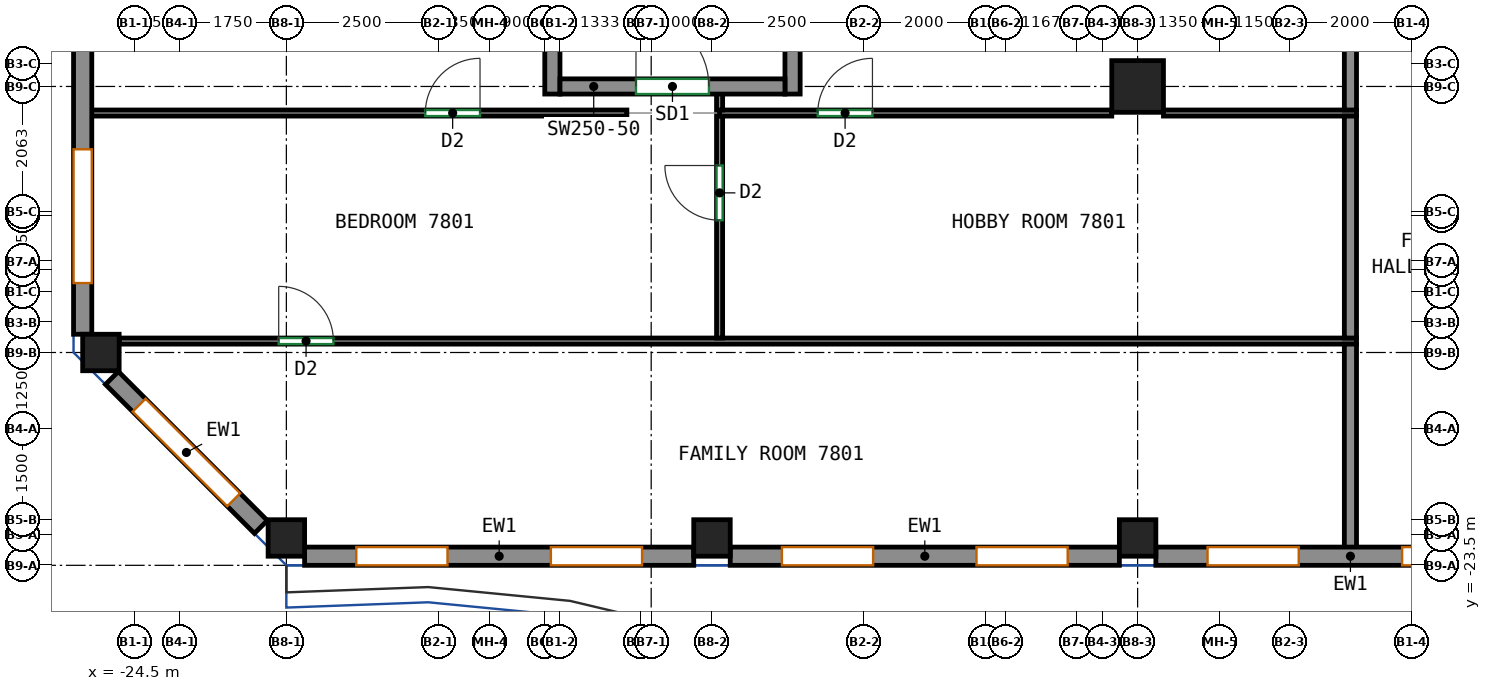
"""IFC4 building model, lengths in metres.
Left out: names, types, materials, properties, quantities, classifications, styles, units other than length and angle.
Written with IfcOpenShell. Run it as: python <this file> out.ifc"""

import sys

from ifc_helpers import new_model, si_unit, direction, frame, frame_2d, origin, origin_2d, place, context, subcontext, project, spatial, rectangle, extrude, source, transform, mapped, element, fill, save


model = new_model("IFC4")
c1 = context("Model", 3, precision=1e-05, world=origin(), true_north=direction((0.0, 1.0)))
c2 = subcontext(c1, "Body", "Model", "MODEL_VIEW")
j1 = project(units=[si_unit("LENGTHUNIT", "METRE"), si_unit("PLANEANGLEUNIT", "RADIAN")], contexts=[c1])
p1 = place(None, origin())
s1 = spatial("IfcSite", under=j1, at=p1, CompositionType="ELEMENT")
p2 = place(p1, origin())
s2 = spatial("IfcBuilding", under=s1, at=p2, CompositionType="ELEMENT")
p3 = place(p2, frame((0.0, 0.0, 312.0)))
s3 = spatial("IfcBuildingStorey", under=s2, at=p3, CompositionType="ELEMENT", Elevation=312.0)
m1 = source(origin(), c2, "Body", "SweptSolid", [
    extrude(rectangle(XDim=0.6, YDim=0.6, at=origin_2d()), origin(), (0.0, 0.0, 1.0), 3.12),
])
for number, where, z_axis, x_axis in (
    (1, (-25.05, -20.0, 0.0), (0.0, 0.0, 1.0), (1.0, 0.0, 0.0)),
    (2, (-22.0, -23.05, 0.0), (0.0, 0.0, 1.0), (1.0, 0.0, 0.0)),
    (3, (-15.0, -23.05, 0.0), (0.0, 0.0, 1.0), (1.0, 0.0, 0.0)),
    (4, (-8.0, -23.05, 0.0), (0.0, 0.0, 1.0), (1.0, 0.0, 0.0)),
):
    element("IfcColumn", number, at=place(p3, frame(where, z_axis=z_axis, x_axis=x_axis)), inside=s3, PredefinedType="COLUMN", context=c2, shape_type="MappedRepresentation", body=[
        mapped(m1, transform((0.0, 0.0, 0.0))),
    ])
m2 = source(origin(), c2, "Body", "SweptSolid", [
    extrude(rectangle(XDim=0.85, YDim=0.85, at=origin_2d()), origin(), (0.0, 0.0, 1.0), 3.12),
])
p4 = place(p3, frame((-8.0, -15.625, 0.0), z_axis=(0.0, 0.0, 1.0), x_axis=(1.0, 0.0, 0.0)))
e5 = element("IfcColumn", 5, at=p4, inside=s3, PredefinedType="COLUMN", context=c2, shape_type="MappedRepresentation", body=[
    mapped(m2, transform((0.0, 0.0, 0.0))),
])
m3 = source(origin(), c2, "Body", "SweptSolid", [
    extrude(rectangle(XDim=8.0, YDim=0.25, at=frame_2d((4.0, 0.0))), origin(), (0.0, 0.0, 1.0), 3.12),
])
for number, where, z_axis, x_axis in (
    (6, (-17.625, -15.75, 0.0), (0.0, 0.0, 1.0), (0.0, 1.0, 0.0)),
    (7, (-13.675, -15.75, 0.0), (0.0, 0.0, 1.0), (0.0, 1.0, 0.0)),
):
    element("IfcWall", number, at=place(p3, frame(where, z_axis=z_axis, x_axis=x_axis)), inside=s3, PredefinedType="SHEAR", context=c2, shape_type="MappedRepresentation", body=[
        mapped(m3, transform((0.0, 0.0, 0.0))),
    ])
m4 = source(origin(), c2, "Body", "SweptSolid", [
    extrude(rectangle(XDim=3.7, YDim=0.25, at=frame_2d((1.85, 0.0))), origin(), (0.0, 0.0, 1.0), 3.12),
])
p5 = place(p3, frame((-17.5, -15.625, 0.0), z_axis=(0.0, 0.0, 1.0), x_axis=(1.0, 0.0, 0.0)))
e8 = element("IfcWall", 8, at=p5, inside=s3, PredefinedType="SHEAR", context=c2, shape_type="MappedRepresentation", body=[
    mapped(m4, transform((0.0, 0.0, 0.0))),
])
p6 = place(p5, frame((1.25, 0.0, 0.0)))
e9 = element("IfcOpeningElement", 9, at=p6, cuts=e8, PredefinedType="OPENING", context=c2, shape_type="SweptSolid", body=[
    extrude(rectangle(XDim=1.2, YDim=2.1, at=frame_2d((0.6, 1.05))), frame((0.0, 0.135, 0.0), z_axis=(0.0, -1.0, 0.0), x_axis=(1.0, 0.0, 0.0)), (0.0, 0.0, 1.0), 0.27),
])
m5 = source(origin(), c2, "Body", "SweptSolid", [
    extrude(rectangle(XDim=6.4, YDim=0.3, at=frame_2d((3.2, 0.0))), origin(), (0.0, 0.0, 1.0), 3.12),
])
p7 = place(p3, frame((-21.7, -23.35, 0.0), z_axis=(0.0, 0.0, 1.0), x_axis=(1.0, 0.0, 0.0)))
e10 = element("IfcWall", 10, at=p7, inside=s3, PredefinedType="SOLIDWALL", context=c2, shape_type="MappedRepresentation", body=[
    mapped(m5, transform((0.0, 0.0, 0.0))),
])
p8 = place(p7, frame((0.85, 0.0, 0.8)))
e11 = element("IfcOpeningElement", 11, at=p8, cuts=e10, PredefinedType="OPENING", context=c2, shape_type="SweptSolid", body=[
    extrude(rectangle(XDim=1.5, YDim=2.05, at=frame_2d((0.75, 1.025))), frame((0.0, 0.16, 0.0), z_axis=(0.0, -1.0, 0.0), x_axis=(1.0, 0.0, 0.0)), (0.0, 0.0, 1.0), 0.32),
])
p9 = place(p7, frame((4.05, 0.0, 0.8)))
e12 = element("IfcOpeningElement", 12, at=p9, cuts=e10, PredefinedType="OPENING", context=c2, shape_type="SweptSolid", body=[
    extrude(rectangle(XDim=1.5, YDim=2.05, at=frame_2d((0.75, 1.025))), frame((0.0, 0.16, 0.0), z_axis=(0.0, -1.0, 0.0), x_axis=(1.0, 0.0, 0.0)), (0.0, 0.0, 1.0), 0.32),
])
p10 = place(p3, frame((-14.7, -23.35, 0.0), z_axis=(0.0, 0.0, 1.0), x_axis=(1.0, 0.0, 0.0)))
e13 = element("IfcWall", 13, at=p10, inside=s3, PredefinedType="SOLIDWALL", context=c2, shape_type="MappedRepresentation", body=[
    mapped(m5, transform((0.0, 0.0, 0.0))),
])
p11 = place(p10, frame((0.85, 0.0, 0.8)))
e14 = element("IfcOpeningElement", 14, at=p11, cuts=e13, PredefinedType="OPENING", context=c2, shape_type="SweptSolid", body=[
    extrude(rectangle(XDim=1.5, YDim=2.05, at=frame_2d((0.75, 1.025))), frame((0.0, 0.16, 0.0), z_axis=(0.0, -1.0, 0.0), x_axis=(1.0, 0.0, 0.0)), (0.0, 0.0, 1.0), 0.32),
])
p12 = place(p10, frame((4.05, 0.0, 0.8)))
e15 = element("IfcOpeningElement", 15, at=p12, cuts=e13, PredefinedType="OPENING", context=c2, shape_type="SweptSolid", body=[
    extrude(rectangle(XDim=1.5, YDim=2.05, at=frame_2d((0.75, 1.025))), frame((0.0, 0.16, 0.0), z_axis=(0.0, -1.0, 0.0), x_axis=(1.0, 0.0, 0.0)), (0.0, 0.0, 1.0), 0.32),
])
p13 = place(p3, frame((-7.7, -23.35, 0.0), z_axis=(0.0, 0.0, 1.0), x_axis=(1.0, 0.0, 0.0)))
e16 = element("IfcWall", 16, at=p13, inside=s3, PredefinedType="SOLIDWALL", context=c2, shape_type="MappedRepresentation", body=[
    mapped(m5, transform((0.0, 0.0, 0.0))),
])
p14 = place(p13, frame((0.85, 0.0, 0.8)))
e17 = element("IfcOpeningElement", 17, at=p14, cuts=e16, PredefinedType="OPENING", context=c2, shape_type="SweptSolid", body=[
    extrude(rectangle(XDim=1.5, YDim=2.05, at=frame_2d((0.75, 1.025))), frame((0.0, 0.16, 0.0), z_axis=(0.0, -1.0, 0.0), x_axis=(1.0, 0.0, 0.0)), (0.0, 0.0, 1.0), 0.32),
])
p15 = place(p13, frame((4.05, 0.0, 0.8)))
e18 = element("IfcOpeningElement", 18, at=p15, cuts=e16, PredefinedType="OPENING", context=c2, shape_type="SweptSolid", body=[
    extrude(rectangle(XDim=1.5, YDim=2.05, at=frame_2d((0.75, 1.025))), frame((0.0, 0.16, 0.0), z_axis=(0.0, -1.0, 0.0), x_axis=(1.0, 0.0, 0.0)), (0.0, 0.0, 1.0), 0.32),
])
m6 = source(origin(), c2, "Body", "SweptSolid", [
    extrude(rectangle(XDim=11.65, YDim=0.3, at=frame_2d((5.825, 0.0))), origin(), (0.0, 0.0, 1.0), 3.12),
])
p16 = place(p3, frame((-25.35, -8.05, 0.0), z_axis=(0.0, 0.0, 1.0), x_axis=(0.0, -1.0, 0.0)))
e19 = element("IfcWall", 19, at=p16, inside=s3, PredefinedType="SOLIDWALL", context=c2, shape_type="MappedRepresentation", body=[
    mapped(m6, transform((0.0, 0.0, 0.0))),
])
p17 = place(p16, frame((0.842, 0.0, 0.8)))
e20 = element("IfcOpeningElement", 20, at=p17, cuts=e19, PredefinedType="OPENING", context=c2, shape_type="SweptSolid", body=[
    extrude(rectangle(XDim=2.2, YDim=2.05, at=frame_2d((1.1, 1.025))), frame((0.0, 0.16, 0.0), z_axis=(0.0, -1.0, 0.0), x_axis=(1.0, 0.0, 0.0)), (0.0, 0.0, 1.0), 0.32),
])
p18 = place(p16, frame((4.725, 0.0, 0.8)))
e21 = element("IfcOpeningElement", 21, at=p18, cuts=e19, PredefinedType="OPENING", context=c2, shape_type="SweptSolid", body=[
    extrude(rectangle(XDim=2.2, YDim=2.05, at=frame_2d((1.1, 1.025))), frame((0.0, 0.16, 0.0), z_axis=(0.0, -1.0, 0.0), x_axis=(1.0, 0.0, 0.0)), (0.0, 0.0, 1.0), 0.32),
])
p19 = place(p16, frame((8.608, 0.0, 0.8)))
e22 = element("IfcOpeningElement", 22, at=p19, cuts=e19, PredefinedType="OPENING", context=c2, shape_type="SweptSolid", body=[
    extrude(rectangle(XDim=2.2, YDim=2.05, at=frame_2d((1.1, 1.025))), frame((0.0, 0.16, 0.0), z_axis=(0.0, -1.0, 0.0), x_axis=(1.0, 0.0, 0.0)), (0.0, 0.0, 1.0), 0.32),
])
m7 = source(origin(), c2, "Body", "SweptSolid", [
    extrude(rectangle(XDim=3.465, YDim=0.3, at=frame_2d((1.732, 0.0))), origin(), (0.0, 0.0, 1.0), 3.12),
])
p20 = place(p3, frame((-24.869, -20.419, 0.0), z_axis=(0.0, 0.0, 1.0), x_axis=(0.707106781187, -0.707106781187, 0.0)))
e23 = element("IfcWall", 23, at=p20, inside=s3, PredefinedType="SOLIDWALL", context=c2, shape_type="MappedRepresentation", body=[
    mapped(m7, transform((0.0, 0.0, 0.0))),
])
p21 = place(p20, frame((0.632, 0.0, 0.8)))
e24 = element("IfcOpeningElement", 24, at=p21, cuts=e23, PredefinedType="OPENING", context=c2, shape_type="SweptSolid", body=[
    extrude(rectangle(XDim=2.2, YDim=2.05, at=frame_2d((1.1, 1.025))), frame((0.0, 0.16, 0.0), z_axis=(0.0, -1.0, 0.0), x_axis=(1.0, 0.0, 0.0)), (0.0, 0.0, 1.0), 0.32),
])
p22 = place(p3, frame((-24.75, -19.812, 0.0), z_axis=(0.0, 0.0, 1.0), x_axis=(1.0, 0.0, 0.0)))
e25 = element("IfcWall", 25, at=p22, inside=s3, PredefinedType="PARTITIONING", context=c2, shape_type="SweptSolid", body=[
    extrude(rectangle(XDim=20.35, YDim=0.1, at=frame_2d((10.175, 0.0))), origin(), (0.0, 0.0, 1.0), 3.12),
])
p23 = place(p22, frame((2.624, 0.0, 0.0)))
e26 = element("IfcOpeningElement", 26, at=p23, cuts=e25, PredefinedType="OPENING", context=c2, shape_type="SweptSolid", body=[
    extrude(rectangle(XDim=0.9, YDim=2.1, at=frame_2d((0.45, 1.05))), frame((0.0, 0.06, 0.0), z_axis=(0.0, -1.0, 0.0), x_axis=(1.0, 0.0, 0.0)), (0.0, 0.0, 1.0), 0.12),
])
p24 = place(p3, frame((-4.5, -23.25, 0.0), z_axis=(0.0, 0.0, 1.0), x_axis=(0.0, 1.0, 0.0)))
e27 = element("IfcWall", 27, at=p24, inside=s3, PredefinedType="PARTITIONING", context=c2, shape_type="SweptSolid", body=[
    extrude(rectangle(XDim=3.388, YDim=0.2, at=frame_2d((1.694, 0.0))), origin(), (0.0, 0.0, 1.0), 3.12),
])
p25 = place(p3, frame((-14.875, -19.762, 0.0), z_axis=(0.0, 0.0, 1.0), x_axis=(0.0, 1.0, 0.0)))
e28 = element("IfcWall", 28, at=p25, inside=s3, PredefinedType="PARTITIONING", context=c2, shape_type="SweptSolid", body=[
    extrude(rectangle(XDim=3.65, YDim=0.1, at=frame_2d((1.825, 0.0))), origin(), (0.0, 0.0, 1.0), 3.12),
])
p26 = place(p25, frame((1.937, 0.0, 0.0)))
e29 = element("IfcOpeningElement", 29, at=p26, cuts=e28, PredefinedType="OPENING", context=c2, shape_type="SweptSolid", body=[
    extrude(rectangle(XDim=0.9, YDim=2.1, at=frame_2d((0.45, 1.05))), frame((0.0, 0.06, 0.0), z_axis=(0.0, -1.0, 0.0), x_axis=(1.0, 0.0, 0.0)), (0.0, 0.0, 1.0), 0.12),
])
p27 = place(p3, frame((-25.25, -16.062, 0.0), z_axis=(0.0, 0.0, 1.0), x_axis=(1.0, 0.0, 0.0)))
e30 = element("IfcWall", 30, at=p27, inside=s3, PredefinedType="PARTITIONING", context=c2, shape_type="SweptSolid", body=[
    extrude(rectangle(XDim=8.85, YDim=0.1, at=frame_2d((4.425, 0.0))), origin(), (0.0, 0.0, 1.0), 3.12),
])
p28 = place(p27, frame((5.535, 0.0, 0.0)))
e31 = element("IfcOpeningElement", 31, at=p28, cuts=e30, PredefinedType="OPENING", context=c2, shape_type="SweptSolid", body=[
    extrude(rectangle(XDim=0.9, YDim=2.1, at=frame_2d((0.45, 1.05))), frame((0.0, 0.06, 0.0), z_axis=(0.0, -1.0, 0.0), x_axis=(1.0, 0.0, 0.0)), (0.0, 0.0, 1.0), 0.12),
])
p29 = place(p3, frame((-7.575, -16.062, 0.0), z_axis=(0.0, 0.0, 1.0), x_axis=(1.0, 0.0, 0.0)))
e32 = element("IfcWall", 32, at=p29, inside=s3, PredefinedType="PARTITIONING", context=c2, shape_type="SweptSolid", body=[
    extrude(rectangle(XDim=3.175, YDim=0.1, at=frame_2d((1.587, 0.0))), origin(), (0.0, 0.0, 1.0), 3.12),
])
p30 = place(p3, frame((-14.875, -16.062, 0.0), z_axis=(0.0, 0.0, 1.0), x_axis=(1.0, 0.0, 0.0)))
e33 = element("IfcWall", 33, at=p30, inside=s3, PredefinedType="PARTITIONING", context=c2, shape_type="SweptSolid", body=[
    extrude(rectangle(XDim=6.45, YDim=0.1, at=frame_2d((3.225, 0.0))), origin(), (0.0, 0.0, 1.0), 3.12),
])
p31 = place(p30, frame((1.614, 0.0, 0.0)))
e34 = element("IfcOpeningElement", 34, at=p31, cuts=e33, PredefinedType="OPENING", context=c2, shape_type="SweptSolid", body=[
    extrude(rectangle(XDim=0.9, YDim=2.1, at=frame_2d((0.45, 1.05))), frame((0.0, 0.06, 0.0), z_axis=(0.0, -1.0, 0.0), x_axis=(1.0, 0.0, 0.0)), (0.0, 0.0, 1.0), 0.12),
])
p32 = place(p3, frame((-4.5, -19.762, 0.0), z_axis=(0.0, 0.0, 1.0), x_axis=(0.0, 1.0, 0.0)))
e35 = element("IfcWall", 35, at=p32, inside=s3, PredefinedType="PARTITIONING", context=c2, shape_type="SweptSolid", body=[
    extrude(rectangle(XDim=3.65, YDim=0.2, at=frame_2d((1.825, 0.0))), origin(), (0.0, 0.0, 1.0), 3.12),
])
p33 = place(p3, frame((-14.875, -16.012, 0.0), z_axis=(0.0, 0.0, 1.0), x_axis=(0.0, 1.0, 0.0)))
e36 = element("IfcWall", 36, at=p33, inside=s3, PredefinedType="PARTITIONING", context=c2, shape_type="SweptSolid", body=[
    extrude(rectangle(XDim=0.312, YDim=0.1, at=frame_2d((0.156, 0.0))), origin(), (0.0, 0.0, 1.0), 3.12),
])
p34 = place(p3, frame((-4.5, -16.012, 0.0), z_axis=(0.0, 0.0, 1.0), x_axis=(0.0, 1.0, 0.0)))
e37 = element("IfcWall", 37, at=p34, inside=s3, PredefinedType="PARTITIONING", context=c2, shape_type="SweptSolid", body=[
    extrude(rectangle(XDim=3.7, YDim=0.2, at=frame_2d((1.85, 0.0))), origin(), (0.0, 0.0, 1.0), 3.12),
])
p35 = place(p8, origin())
e38 = element("IfcWindow", 38, at=p35, inside=s3, PartitioningType="SINGLE_PANEL", PredefinedType="WINDOW", context=c2, shape_type="SweptSolid", body=[
    extrude(rectangle(XDim=1.5, YDim=2.05, at=frame_2d((0.75, 1.025))), frame((0.0, 0.03, 0.0), z_axis=(0.0, -1.0, 0.0), x_axis=(1.0, 0.0, 0.0)), (0.0, 0.0, 1.0), 0.06),
])
fill(e11, e38)
p36 = place(p9, origin())
e39 = element("IfcWindow", 39, at=p36, inside=s3, PartitioningType="SINGLE_PANEL", PredefinedType="WINDOW", context=c2, shape_type="SweptSolid", body=[
    extrude(rectangle(XDim=1.5, YDim=2.05, at=frame_2d((0.75, 1.025))), frame((0.0, 0.03, 0.0), z_axis=(0.0, -1.0, 0.0), x_axis=(1.0, 0.0, 0.0)), (0.0, 0.0, 1.0), 0.06),
])
fill(e12, e39)
p37 = place(p11, origin())
e40 = element("IfcWindow", 40, at=p37, inside=s3, PartitioningType="SINGLE_PANEL", PredefinedType="WINDOW", context=c2, shape_type="SweptSolid", body=[
    extrude(rectangle(XDim=1.5, YDim=2.05, at=frame_2d((0.75, 1.025))), frame((0.0, 0.03, 0.0), z_axis=(0.0, -1.0, 0.0), x_axis=(1.0, 0.0, 0.0)), (0.0, 0.0, 1.0), 0.06),
])
fill(e14, e40)
p38 = place(p12, origin())
e41 = element("IfcWindow", 41, at=p38, inside=s3, PartitioningType="SINGLE_PANEL", PredefinedType="WINDOW", context=c2, shape_type="SweptSolid", body=[
    extrude(rectangle(XDim=1.5, YDim=2.05, at=frame_2d((0.75, 1.025))), frame((0.0, 0.03, 0.0), z_axis=(0.0, -1.0, 0.0), x_axis=(1.0, 0.0, 0.0)), (0.0, 0.0, 1.0), 0.06),
])
fill(e15, e41)
p39 = place(p14, origin())
e42 = element("IfcWindow", 42, at=p39, inside=s3, PartitioningType="SINGLE_PANEL", PredefinedType="WINDOW", context=c2, shape_type="SweptSolid", body=[
    extrude(rectangle(XDim=1.5, YDim=2.05, at=frame_2d((0.75, 1.025))), frame((0.0, 0.03, 0.0), z_axis=(0.0, -1.0, 0.0), x_axis=(1.0, 0.0, 0.0)), (0.0, 0.0, 1.0), 0.06),
])
fill(e17, e42)
p40 = place(p15, origin())
e43 = element("IfcWindow", 43, at=p40, inside=s3, PartitioningType="SINGLE_PANEL", PredefinedType="WINDOW", context=c2, shape_type="SweptSolid", body=[
    extrude(rectangle(XDim=1.5, YDim=2.05, at=frame_2d((0.75, 1.025))), frame((0.0, 0.03, 0.0), z_axis=(0.0, -1.0, 0.0), x_axis=(1.0, 0.0, 0.0)), (0.0, 0.0, 1.0), 0.06),
])
fill(e18, e43)
p41 = place(p19, origin())
e44 = element("IfcWindow", 44, at=p41, inside=s3, PartitioningType="SINGLE_PANEL", PredefinedType="WINDOW", context=c2, shape_type="SweptSolid", body=[
    extrude(rectangle(XDim=2.2, YDim=2.05, at=frame_2d((1.1, 1.025))), frame((0.0, 0.03, 0.0), z_axis=(0.0, -1.0, 0.0), x_axis=(1.0, 0.0, 0.0)), (0.0, 0.0, 1.0), 0.06),
])
fill(e22, e44)
p42 = place(p21, origin())
e45 = element("IfcWindow", 45, at=p42, inside=s3, PartitioningType="SINGLE_PANEL", PredefinedType="WINDOW", context=c2, shape_type="SweptSolid", body=[
    extrude(rectangle(XDim=2.2, YDim=2.05, at=frame_2d((1.1, 1.025))), frame((0.0, 0.03, 0.0), z_axis=(0.0, -1.0, 0.0), x_axis=(1.0, 0.0, 0.0)), (0.0, 0.0, 1.0), 0.06),
])
fill(e24, e45)
p43 = place(p6, origin())
e46 = element("IfcDoor", 46, at=p43, inside=s3, OperationType="DOUBLE_DOOR_SINGLE_SWING", PredefinedType="DOOR", context=c2, shape_type="SweptSolid", body=[
    extrude(rectangle(XDim=1.2, YDim=2.1, at=frame_2d((0.6, 1.05))), frame((0.0, 0.025, 0.0), z_axis=(0.0, -1.0, 0.0), x_axis=(1.0, 0.0, 0.0)), (0.0, 0.0, 1.0), 0.05),
])
fill(e9, e46)
p44 = place(p23, origin())
e47 = element("IfcDoor", 47, at=p44, inside=s3, OperationType="SINGLE_SWING_LEFT", PredefinedType="DOOR", context=c2, shape_type="SweptSolid", body=[
    extrude(rectangle(XDim=0.9, YDim=2.1, at=frame_2d((0.45, 1.05))), frame((0.0, 0.025, 0.0), z_axis=(0.0, -1.0, 0.0), x_axis=(1.0, 0.0, 0.0)), (0.0, 0.0, 1.0), 0.05),
])
fill(e26, e47)
p45 = place(p26, origin())
e48 = element("IfcDoor", 48, at=p45, inside=s3, OperationType="SINGLE_SWING_RIGHT", PredefinedType="DOOR", context=c2, shape_type="SweptSolid", body=[
    extrude(rectangle(XDim=0.9, YDim=2.1, at=frame_2d((0.45, 1.05))), frame((0.0, 0.025, 0.0), z_axis=(0.0, -1.0, 0.0), x_axis=(1.0, 0.0, 0.0)), (0.0, 0.0, 1.0), 0.05),
])
fill(e29, e48)
p46 = place(p28, origin())
e49 = element("IfcDoor", 49, at=p46, inside=s3, OperationType="SINGLE_SWING_RIGHT", PredefinedType="DOOR", context=c2, shape_type="SweptSolid", body=[
    extrude(rectangle(XDim=0.9, YDim=2.1, at=frame_2d((0.45, 1.05))), frame((0.0, 0.025, 0.0), z_axis=(0.0, -1.0, 0.0), x_axis=(1.0, 0.0, 0.0)), (0.0, 0.0, 1.0), 0.05),
])
fill(e31, e49)
p47 = place(p31, origin())
e50 = element("IfcDoor", 50, at=p47, inside=s3, OperationType="SINGLE_SWING_RIGHT", PredefinedType="DOOR", context=c2, shape_type="SweptSolid", body=[
    extrude(rectangle(XDim=0.9, YDim=2.1, at=frame_2d((0.45, 1.05))), frame((0.0, 0.025, 0.0), z_axis=(0.0, -1.0, 0.0), x_axis=(1.0, 0.0, 0.0)), (0.0, 0.0, 1.0), 0.05),
])
fill(e34, e50)
save(model, sys.argv[1])
